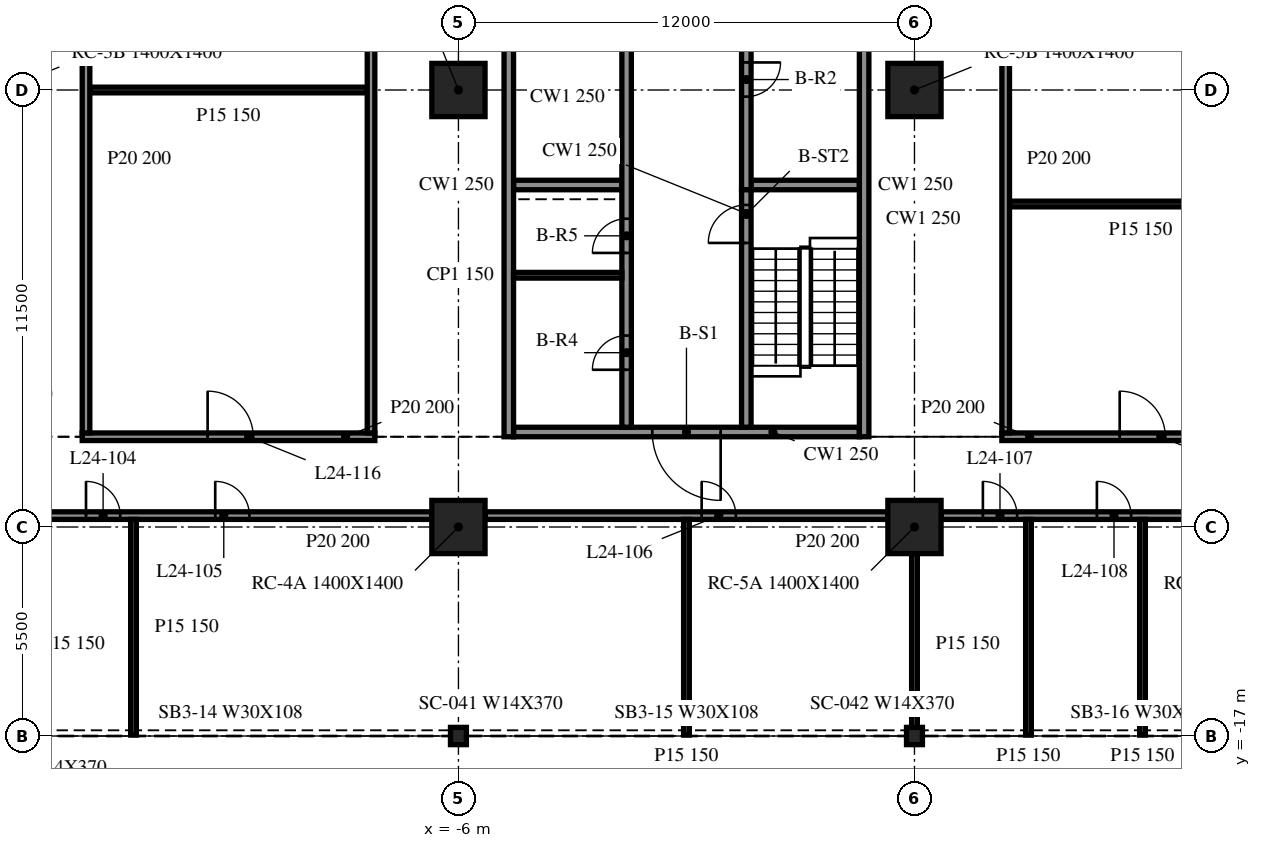
"""IFC4 building model, lengths in metres.
Left out: names, types, materials, properties, quantities, classifications, styles, units other than length and angle.
Written with IfcOpenShell. Run it as: python <this file> out.ifc"""

import sys

from ifc_helpers import new_model, si_unit, direction, frame, frame_2d, origin, origin_2d, place, context, subcontext, project, spatial, rectangle, i_section, extrude, element, fill, save


model = new_model("IFC4")
c1 = context("Model", 3, precision=1e-05, world=origin(), true_north=direction((0.0, 1.0)))
c2 = subcontext(c1, "Body", "Model", "MODEL_VIEW")
j1 = project(units=[si_unit("LENGTHUNIT", "METRE"), si_unit("PLANEANGLEUNIT", "RADIAN")], contexts=[c1])
p1 = place(None, origin())
s1 = spatial("IfcSite", under=j1, at=p1, CompositionType="ELEMENT")
p2 = place(p1, origin())
s2 = spatial("IfcBuilding", under=s1, at=p2, CompositionType="ELEMENT")
p3 = place(p2, frame((0.0, 0.0, 105.3)))
s3 = spatial("IfcBuildingStorey", under=s2, at=p3, CompositionType="ELEMENT", Elevation=105.3)
for number, where, z_axis, x_axis in (
    (1, (-6.0, -11.5, -0.34), (0.0, 0.0, 1.0), (1.0, 0.0, 0.0)),
    (2, (-6.0, 0.0, -0.34), (0.0, 0.0, 1.0), (1.0, 0.0, 0.0)),
    (3, (6.0, -11.5, -0.34), (0.0, 0.0, 1.0), (1.0, 0.0, 0.0)),
    (4, (6.0, 0.0, -0.34), (0.0, 0.0, 1.0), (1.0, 0.0, 0.0)),
):
    element("IfcColumn", number, at=place(p3, frame(where, z_axis=z_axis, x_axis=x_axis)), inside=s3, PredefinedType="COLUMN", context=c2, shape_type="SweptSolid", body=[
        extrude(rectangle(XDim=1.4, YDim=1.4, at=origin_2d()), origin(), (0.0, 0.0, 1.0), 4.1),
    ])
for number, where, z_axis, x_axis in (
    (5, (-6.0, -17.0, -0.34), (0.0, 0.0, 1.0), (1.0, 0.0, 0.0)),
    (6, (6.0, -17.0, -0.34), (0.0, 0.0, 1.0), (1.0, 0.0, 0.0)),
):
    element("IfcColumn", number, at=place(p3, frame(where, z_axis=z_axis, x_axis=x_axis)), inside=s3, PredefinedType="COLUMN", context=c2, shape_type="SweptSolid", body=[
        extrude(i_section(OverallWidth=0.419, OverallDepth=0.455, WebThickness=0.042, FlangeThickness=0.068, at=origin_2d()), origin(), (0.0, 0.0, 1.0), 4.1),
    ])
for number, where, z_axis, x_axis in (
    (7, (-4.675, 15.125, 0.0), (0.0, 0.0, 1.0), (0.0, -1.0, 0.0)),
    (8, (4.675, -9.125, 0.0), (0.0, 0.0, 1.0), (0.0, 1.0, 0.0)),
):
    element("IfcWall", number, at=place(p3, frame(where, z_axis=z_axis, x_axis=x_axis)), inside=s3, PredefinedType="SOLIDWALL", context=c2, shape_type="SweptSolid", body=[
        extrude(rectangle(XDim=24.25, YDim=0.25, at=frame_2d((12.125, 0.0))), origin(), (0.0, 0.0, 1.0), 3.76),
    ])
p4 = place(p3, frame((4.55, -9.0, 0.0), z_axis=(0.0, 0.0, 1.0), x_axis=(-1.0, 0.0, 0.0)))
e9 = element("IfcWall", 9, at=p4, inside=s3, PredefinedType="SOLIDWALL", context=c2, shape_type="SweptSolid", body=[
    extrude(rectangle(XDim=9.1, YDim=0.25, at=frame_2d((4.55, 0.0))), origin(), (0.0, 0.0, 1.0), 3.76),
])
p5 = place(p4, frame((3.65, 0.0, 0.0)))
e10 = element("IfcOpeningElement", 10, at=p5, cuts=e9, PredefinedType="OPENING", context=c2, shape_type="SweptSolid", body=[
    extrude(rectangle(XDim=1.8, YDim=2.1, at=frame_2d((0.9, 1.05))), frame((0.0, 0.135, 0.0), z_axis=(0.0, -1.0, 0.0), x_axis=(1.0, 0.0, 0.0)), (0.0, 0.0, 1.0), 0.27),
])
p6 = place(p3, frame((-1.575, -8.875, 0.0), z_axis=(0.0, 0.0, 1.0), x_axis=(0.0, 1.0, 0.0)))
e11 = element("IfcWall", 11, at=p6, inside=s3, PredefinedType="SOLIDWALL", context=c2, shape_type="SweptSolid", body=[
    extrude(rectangle(XDim=23.75, YDim=0.25, at=frame_2d((11.875, 0.0))), origin(), (0.0, 0.0, 1.0), 3.76),
])
p7 = place(p6, frame((11.425, 0.0, 0.0)))
e12 = element("IfcOpeningElement", 12, at=p7, cuts=e11, PredefinedType="OPENING", context=c2, shape_type="SweptSolid", body=[
    extrude(rectangle(XDim=0.9, YDim=2.1, at=frame_2d((0.45, 1.05))), frame((0.0, 0.135, 0.0), z_axis=(0.0, -1.0, 0.0), x_axis=(1.0, 0.0, 0.0)), (0.0, 0.0, 1.0), 0.27),
])
p8 = place(p6, frame((1.512, 0.0, 0.0)))
e13 = element("IfcOpeningElement", 13, at=p8, cuts=e11, PredefinedType="OPENING", context=c2, shape_type="SweptSolid", body=[
    extrude(rectangle(XDim=0.9, YDim=2.1, at=frame_2d((0.45, 1.05))), frame((0.0, 0.135, 0.0), z_axis=(0.0, -1.0, 0.0), x_axis=(1.0, 0.0, 0.0)), (0.0, 0.0, 1.0), 0.27),
])
p9 = place(p6, frame((4.587, 0.0, 0.0)))
e14 = element("IfcOpeningElement", 14, at=p9, cuts=e11, PredefinedType="OPENING", context=c2, shape_type="SweptSolid", body=[
    extrude(rectangle(XDim=0.9, YDim=2.1, at=frame_2d((0.45, 1.05))), frame((0.0, 0.135, 0.0), z_axis=(0.0, -1.0, 0.0), x_axis=(1.0, 0.0, 0.0)), (0.0, 0.0, 1.0), 0.27),
])
p10 = place(p6, frame((18.462, 0.0, 0.0)))
e15 = element("IfcOpeningElement", 15, at=p10, cuts=e11, PredefinedType="OPENING", context=c2, shape_type="SweptSolid", body=[
    extrude(rectangle(XDim=0.9, YDim=2.1, at=frame_2d((0.45, 1.05))), frame((0.0, 0.135, 0.0), z_axis=(0.0, -1.0, 0.0), x_axis=(1.0, 0.0, 0.0)), (0.0, 0.0, 1.0), 0.27),
])
p11 = place(p6, frame((21.538, 0.0, 0.0)))
e16 = element("IfcOpeningElement", 16, at=p11, cuts=e11, PredefinedType="OPENING", context=c2, shape_type="SweptSolid", body=[
    extrude(rectangle(XDim=0.9, YDim=2.1, at=frame_2d((0.45, 1.05))), frame((0.0, 0.135, 0.0), z_axis=(0.0, -1.0, 0.0), x_axis=(1.0, 0.0, 0.0)), (0.0, 0.0, 1.0), 0.27),
])
p12 = place(p3, frame((1.575, -8.875, 0.0), z_axis=(0.0, 0.0, 1.0), x_axis=(0.0, 1.0, 0.0)))
e17 = element("IfcWall", 17, at=p12, inside=s3, PredefinedType="SOLIDWALL", context=c2, shape_type="SweptSolid", body=[
    extrude(rectangle(XDim=6.25, YDim=0.25, at=frame_2d((3.125, 0.0))), origin(), (0.0, 0.0, 1.0), 3.76),
])
p13 = place(p12, frame((4.85, 0.0, 0.0)))
e18 = element("IfcOpeningElement", 18, at=p13, cuts=e17, PredefinedType="OPENING", context=c2, shape_type="SweptSolid", body=[
    extrude(rectangle(XDim=1.0, YDim=2.1, at=frame_2d((0.5, 1.05))), frame((0.0, 0.135, 0.0), z_axis=(0.0, -1.0, 0.0), x_axis=(1.0, 0.0, 0.0)), (0.0, 0.0, 1.0), 0.27),
])
p14 = place(p3, frame((1.575, 14.875, 0.0), z_axis=(0.0, 0.0, 1.0), x_axis=(0.0, -1.0, 0.0)))
e19 = element("IfcWall", 19, at=p14, inside=s3, PredefinedType="SOLIDWALL", context=c2, shape_type="SweptSolid", body=[
    extrude(rectangle(XDim=17.5, YDim=0.25, at=frame_2d((8.75, 0.0))), origin(), (0.0, 0.0, 1.0), 3.76),
])
p15 = place(p14, frame((14.15, 0.0, 0.0)))
e20 = element("IfcOpeningElement", 20, at=p15, cuts=e19, PredefinedType="OPENING", context=c2, shape_type="SweptSolid", body=[
    extrude(rectangle(XDim=0.9, YDim=2.1, at=frame_2d((0.45, 1.05))), frame((0.0, 0.135, 0.0), z_axis=(0.0, -1.0, 0.0), x_axis=(1.0, 0.0, 0.0)), (0.0, 0.0, 1.0), 0.27),
])
p16 = place(p14, frame((8.7, 0.0, 0.0)))
e21 = element("IfcOpeningElement", 21, at=p16, cuts=e19, PredefinedType="OPENING", context=c2, shape_type="SweptSolid", body=[
    extrude(rectangle(XDim=0.9, YDim=2.1, at=frame_2d((0.45, 1.05))), frame((0.0, 0.135, 0.0), z_axis=(0.0, -1.0, 0.0), x_axis=(1.0, 0.0, 0.0)), (0.0, 0.0, 1.0), 0.27),
])
p17 = place(p14, frame((4.587, 0.0, 0.0)))
e22 = element("IfcOpeningElement", 22, at=p17, cuts=e19, PredefinedType="OPENING", context=c2, shape_type="SweptSolid", body=[
    extrude(rectangle(XDim=0.9, YDim=2.1, at=frame_2d((0.45, 1.05))), frame((0.0, 0.135, 0.0), z_axis=(0.0, -1.0, 0.0), x_axis=(1.0, 0.0, 0.0)), (0.0, 0.0, 1.0), 0.27),
])
p18 = place(p14, frame((2.55, 0.0, 0.0)))
e23 = element("IfcOpeningElement", 23, at=p18, cuts=e19, PredefinedType="OPENING", context=c2, shape_type="SweptSolid", body=[
    extrude(rectangle(XDim=0.9, YDim=2.1, at=frame_2d((0.45, 1.05))), frame((0.0, 0.135, 0.0), z_axis=(0.0, -1.0, 0.0), x_axis=(1.0, 0.0, 0.0)), (0.0, 0.0, 1.0), 0.27),
])
p19 = place(p14, frame((0.512, 0.0, 0.0)))
e24 = element("IfcOpeningElement", 24, at=p19, cuts=e19, PredefinedType="OPENING", context=c2, shape_type="SweptSolid", body=[
    extrude(rectangle(XDim=0.9, YDim=2.1, at=frame_2d((0.45, 1.05))), frame((0.0, 0.135, 0.0), z_axis=(0.0, -1.0, 0.0), x_axis=(1.0, 0.0, 0.0)), (0.0, 0.0, 1.0), 0.27),
])
for number, where, z_axis, x_axis in (
    (25, (-4.55, -2.5, 0.0), (0.0, 0.0, 1.0), (1.0, 0.0, 0.0)),
    (26, (1.7, -2.5, 0.0), (0.0, 0.0, 1.0), (1.0, 0.0, 0.0)),
):
    element("IfcWall", number, at=place(p3, frame(where, z_axis=z_axis, x_axis=x_axis)), inside=s3, PredefinedType="SOLIDWALL", context=c2, shape_type="SweptSolid", body=[
        extrude(rectangle(XDim=2.85, YDim=0.25, at=frame_2d((1.425, 0.0))), origin(), (0.0, 0.0, 1.0), 3.76),
    ])
p20 = place(p3, frame((-4.55, -4.875, 0.0), z_axis=(0.0, 0.0, 1.0), x_axis=(1.0, 0.0, 0.0)))
e27 = element("IfcWall", 27, at=p20, inside=s3, PredefinedType="PARTITIONING", context=c2, shape_type="SweptSolid", body=[
    extrude(rectangle(XDim=2.85, YDim=0.15, at=frame_2d((1.425, 0.0))), origin(), (0.0, 0.0, 1.0), 3.76),
])
p21 = place(p3, frame((-17.3, -11.2, 0.0), z_axis=(0.0, 0.0, 1.0), x_axis=(1.0, 0.0, 0.0)))
e28 = element("IfcWall", 28, at=p21, inside=s3, PredefinedType="PARTITIONING", context=c2, shape_type="SweptSolid", body=[
    extrude(rectangle(XDim=10.6, YDim=0.2, at=frame_2d((5.3, 0.0))), origin(), (0.0, 0.0, 1.0), 3.76),
])
p22 = place(p21, frame((1.5, 0.0, 0.0)))
e29 = element("IfcOpeningElement", 29, at=p22, cuts=e28, PredefinedType="OPENING", context=c2, shape_type="SweptSolid", body=[
    extrude(rectangle(XDim=0.9, YDim=2.1, at=frame_2d((0.45, 1.05))), frame((0.0, 0.11, 0.0), z_axis=(0.0, -1.0, 0.0), x_axis=(1.0, 0.0, 0.0)), (0.0, 0.0, 1.0), 0.22),
])
p23 = place(p21, frame((4.9, 0.0, 0.0)))
e30 = element("IfcOpeningElement", 30, at=p23, cuts=e28, PredefinedType="OPENING", context=c2, shape_type="SweptSolid", body=[
    extrude(rectangle(XDim=0.9, YDim=2.1, at=frame_2d((0.45, 1.05))), frame((0.0, 0.11, 0.0), z_axis=(0.0, -1.0, 0.0), x_axis=(1.0, 0.0, 0.0)), (0.0, 0.0, 1.0), 0.22),
])
p24 = place(p3, frame((-5.3, -11.2, 0.0), z_axis=(0.0, 0.0, 1.0), x_axis=(1.0, 0.0, 0.0)))
e31 = element("IfcWall", 31, at=p24, inside=s3, PredefinedType="PARTITIONING", context=c2, shape_type="SweptSolid", body=[
    extrude(rectangle(XDim=10.6, YDim=0.2, at=frame_2d((5.3, 0.0))), origin(), (0.0, 0.0, 1.0), 3.76),
])
p25 = place(p24, frame((5.7, 0.0, 0.0)))
e32 = element("IfcOpeningElement", 32, at=p25, cuts=e31, PredefinedType="OPENING", context=c2, shape_type="SweptSolid", body=[
    extrude(rectangle(XDim=0.9, YDim=2.1, at=frame_2d((0.45, 1.05))), frame((0.0, 0.11, 0.0), z_axis=(0.0, -1.0, 0.0), x_axis=(1.0, 0.0, 0.0)), (0.0, 0.0, 1.0), 0.22),
])
p26 = place(p3, frame((6.7, -11.2, 0.0), z_axis=(0.0, 0.0, 1.0), x_axis=(1.0, 0.0, 0.0)))
e33 = element("IfcWall", 33, at=p26, inside=s3, PredefinedType="PARTITIONING", context=c2, shape_type="SweptSolid", body=[
    extrude(rectangle(XDim=10.6, YDim=0.2, at=frame_2d((5.3, 0.0))), origin(), (0.0, 0.0, 1.0), 3.76),
])
p27 = place(p26, frame((1.1, 0.0, 0.0)))
e34 = element("IfcOpeningElement", 34, at=p27, cuts=e33, PredefinedType="OPENING", context=c2, shape_type="SweptSolid", body=[
    extrude(rectangle(XDim=0.9, YDim=2.1, at=frame_2d((0.45, 1.05))), frame((0.0, 0.11, 0.0), z_axis=(0.0, -1.0, 0.0), x_axis=(1.0, 0.0, 0.0)), (0.0, 0.0, 1.0), 0.22),
])
p28 = place(p26, frame((4.1, 0.0, 0.0)))
e35 = element("IfcOpeningElement", 35, at=p28, cuts=e33, PredefinedType="OPENING", context=c2, shape_type="SweptSolid", body=[
    extrude(rectangle(XDim=0.9, YDim=2.1, at=frame_2d((0.45, 1.05))), frame((0.0, 0.11, 0.0), z_axis=(0.0, -1.0, 0.0), x_axis=(1.0, 0.0, 0.0)), (0.0, 0.0, 1.0), 0.22),
])
p29 = place(p3, frame((-15.9, -9.125, 0.0), z_axis=(0.0, 0.0, 1.0), x_axis=(1.0, 0.0, 0.0)))
e36 = element("IfcWall", 36, at=p29, inside=s3, PredefinedType="PARTITIONING", context=c2, shape_type="SweptSolid", body=[
    extrude(rectangle(XDim=7.7, YDim=0.2, at=frame_2d((3.85, 0.0))), origin(), (0.0, 0.0, 1.0), 3.76),
])
p30 = place(p29, frame((3.3, 0.0, 0.0)))
e37 = element("IfcOpeningElement", 37, at=p30, cuts=e36, PredefinedType="OPENING", context=c2, shape_type="SweptSolid", body=[
    extrude(rectangle(XDim=1.2, YDim=2.1, at=frame_2d((0.6, 1.05))), frame((0.0, 0.11, 0.0), z_axis=(0.0, -1.0, 0.0), x_axis=(1.0, 0.0, 0.0)), (0.0, 0.0, 1.0), 0.22),
])
p31 = place(p3, frame((8.3, -9.125, 0.0), z_axis=(0.0, 0.0, 1.0), x_axis=(1.0, 0.0, 0.0)))
e38 = element("IfcWall", 38, at=p31, inside=s3, PredefinedType="PARTITIONING", context=c2, shape_type="SweptSolid", body=[
    extrude(rectangle(XDim=7.3, YDim=0.2, at=frame_2d((3.65, 0.0))), origin(), (0.0, 0.0, 1.0), 3.76),
])
p32 = place(p31, frame((3.1, 0.0, 0.0)))
e39 = element("IfcOpeningElement", 39, at=p32, cuts=e38, PredefinedType="OPENING", context=c2, shape_type="SweptSolid", body=[
    extrude(rectangle(XDim=1.2, YDim=2.1, at=frame_2d((0.6, 1.05))), frame((0.0, 0.11, 0.0), z_axis=(0.0, -1.0, 0.0), x_axis=(1.0, 0.0, 0.0)), (0.0, 0.0, 1.0), 0.22),
])
p33 = place(p3, frame((8.5, -3.0, 0.0), z_axis=(0.0, 0.0, 1.0), x_axis=(1.0, 0.0, 0.0)))
e40 = element("IfcWall", 40, at=p33, inside=s3, PredefinedType="PARTITIONING", context=c2, shape_type="SweptSolid", body=[
    extrude(rectangle(XDim=6.9, YDim=0.15, at=frame_2d((3.45, 0.0))), origin(), (0.0, 0.0, 1.0), 3.76),
])
p34 = place(p3, frame((-15.7, 0.0, 0.0), z_axis=(0.0, 0.0, 1.0), x_axis=(1.0, 0.0, 0.0)))
e41 = element("IfcWall", 41, at=p34, inside=s3, PredefinedType="PARTITIONING", context=c2, shape_type="SweptSolid", body=[
    extrude(rectangle(XDim=7.3, YDim=0.15, at=frame_2d((3.65, 0.0))), origin(), (0.0, 0.0, 1.0), 3.76),
])
p35 = place(p3, frame((-15.8, -9.025, 0.0), z_axis=(0.0, 0.0, 1.0), x_axis=(0.0, 1.0, 0.0)))
e42 = element("IfcWall", 42, at=p35, inside=s3, PredefinedType="PARTITIONING", context=c2, shape_type="SweptSolid", body=[
    extrude(rectangle(XDim=24.05, YDim=0.2, at=frame_2d((12.025, 0.0))), origin(), (0.0, 0.0, 1.0), 3.76),
])
p36 = place(p35, frame((11.5, 0.0, 0.0)))
e43 = element("IfcOpeningElement", 43, at=p36, cuts=e42, PredefinedType="OPENING", context=c2, shape_type="SweptSolid", body=[
    extrude(rectangle(XDim=1.0, YDim=2.1, at=frame_2d((0.5, 1.05))), frame((0.0, 0.11, 0.0), z_axis=(0.0, -1.0, 0.0), x_axis=(1.0, 0.0, 0.0)), (0.0, 0.0, 1.0), 0.22),
])
p37 = place(p3, frame((-14.55, -16.975, 0.0), z_axis=(0.0, 0.0, 1.0), x_axis=(0.0, 1.0, 0.0)))
e44 = element("IfcWall", 44, at=p37, inside=s3, PredefinedType="PARTITIONING", context=c2, shape_type="SweptSolid", body=[
    extrude(rectangle(XDim=5.675, YDim=0.15, at=frame_2d((2.837, 0.0))), origin(), (0.0, 0.0, 1.0), 3.76),
])
p38 = place(p3, frame((-8.3, -9.025, 0.0), z_axis=(0.0, 0.0, 1.0), x_axis=(0.0, 1.0, 0.0)))
e45 = element("IfcWall", 45, at=p38, inside=s3, PredefinedType="PARTITIONING", context=c2, shape_type="SweptSolid", body=[
    extrude(rectangle(XDim=24.05, YDim=0.2, at=frame_2d((12.025, 0.0))), origin(), (0.0, 0.0, 1.0), 3.76),
])
p39 = place(p3, frame((0.0, -16.975, 0.0), z_axis=(0.0, 0.0, 1.0), x_axis=(0.0, 1.0, 0.0)))
e46 = element("IfcWall", 46, at=p39, inside=s3, PredefinedType="PARTITIONING", context=c2, shape_type="SweptSolid", body=[
    extrude(rectangle(XDim=5.675, YDim=0.15, at=frame_2d((2.837, 0.0))), origin(), (0.0, 0.0, 1.0), 3.76),
])
p40 = place(p3, frame((6.0, -16.975, 0.0), z_axis=(0.0, 0.0, 1.0), x_axis=(0.0, 1.0, 0.0)))
e47 = element("IfcWall", 47, at=p40, inside=s3, PredefinedType="PARTITIONING", context=c2, shape_type="SweptSolid", body=[
    extrude(rectangle(XDim=4.775, YDim=0.15, at=frame_2d((2.388, 0.0))), origin(), (0.0, 0.0, 1.0), 3.76),
])
p41 = place(p3, frame((8.4, -9.025, 0.0), z_axis=(0.0, 0.0, 1.0), x_axis=(0.0, 1.0, 0.0)))
e48 = element("IfcWall", 48, at=p41, inside=s3, PredefinedType="PARTITIONING", context=c2, shape_type="SweptSolid", body=[
    extrude(rectangle(XDim=24.05, YDim=0.2, at=frame_2d((12.025, 0.0))), origin(), (0.0, 0.0, 1.0), 3.76),
])
p42 = place(p41, frame((11.5, 0.0, 0.0)))
e49 = element("IfcOpeningElement", 49, at=p42, cuts=e48, PredefinedType="OPENING", context=c2, shape_type="SweptSolid", body=[
    extrude(rectangle(XDim=1.0, YDim=2.1, at=frame_2d((0.5, 1.05))), frame((0.0, 0.11, 0.0), z_axis=(0.0, -1.0, 0.0), x_axis=(1.0, 0.0, 0.0)), (0.0, 0.0, 1.0), 0.22),
])
for number, where, z_axis, x_axis in (
    (50, (9.0, -16.975, 0.0), (0.0, 0.0, 1.0), (0.0, 1.0, 0.0)),
    (51, (12.0, -16.975, 0.0), (0.0, 0.0, 1.0), (0.0, 1.0, 0.0)),
):
    element("IfcWall", number, at=place(p3, frame(where, z_axis=z_axis, x_axis=x_axis)), inside=s3, PredefinedType="PARTITIONING", context=c2, shape_type="SweptSolid", body=[
        extrude(rectangle(XDim=5.675, YDim=0.15, at=frame_2d((2.837, 0.0))), origin(), (0.0, 0.0, 1.0), 3.76),
    ])
p43 = place(p5, origin())
e52 = element("IfcDoor", 52, at=p43, inside=s3, OperationType="DOUBLE_DOOR_SINGLE_SWING", PredefinedType="DOOR", context=c2, shape_type="SweptSolid", body=[
    extrude(rectangle(XDim=1.8, YDim=2.1, at=frame_2d((0.9, 1.05))), frame((0.0, 0.025, 0.0), z_axis=(0.0, -1.0, 0.0), x_axis=(1.0, 0.0, 0.0)), (0.0, 0.0, 1.0), 0.05),
])
fill(e10, e52)
p44 = place(p15, origin())
e53 = element("IfcDoor", 53, at=p44, inside=s3, OperationType="SINGLE_SWING_RIGHT", PredefinedType="DOOR", context=c2, shape_type="SweptSolid", body=[
    extrude(rectangle(XDim=0.9, YDim=2.1, at=frame_2d((0.45, 1.05))), frame((0.0, 0.025, 0.0), z_axis=(0.0, -1.0, 0.0), x_axis=(1.0, 0.0, 0.0)), (0.0, 0.0, 1.0), 0.05),
])
fill(e20, e53)
p45 = place(p8, origin())
e54 = element("IfcDoor", 54, at=p45, inside=s3, OperationType="SINGLE_SWING_RIGHT", PredefinedType="DOOR", context=c2, shape_type="SweptSolid", body=[
    extrude(rectangle(XDim=0.9, YDim=2.1, at=frame_2d((0.45, 1.05))), frame((0.0, 0.025, 0.0), z_axis=(0.0, -1.0, 0.0), x_axis=(1.0, 0.0, 0.0)), (0.0, 0.0, 1.0), 0.05),
])
fill(e13, e54)
p46 = place(p9, origin())
e55 = element("IfcDoor", 55, at=p46, inside=s3, OperationType="SINGLE_SWING_LEFT", PredefinedType="DOOR", context=c2, shape_type="SweptSolid", body=[
    extrude(rectangle(XDim=0.9, YDim=2.1, at=frame_2d((0.45, 1.05))), frame((0.0, 0.025, 0.0), z_axis=(0.0, -1.0, 0.0), x_axis=(1.0, 0.0, 0.0)), (0.0, 0.0, 1.0), 0.05),
])
fill(e14, e55)
p47 = place(p13, origin())
e56 = element("IfcDoor", 56, at=p47, inside=s3, OperationType="SINGLE_SWING_LEFT", PredefinedType="DOOR", context=c2, shape_type="SweptSolid", body=[
    extrude(rectangle(XDim=1.0, YDim=2.1, at=frame_2d((0.5, 1.05))), frame((0.0, 0.025, 0.0), z_axis=(0.0, -1.0, 0.0), x_axis=(1.0, 0.0, 0.0)), (0.0, 0.0, 1.0), 0.05),
])
fill(e18, e56)
p48 = place(p22, origin())
e57 = element("IfcDoor", 57, at=p48, inside=s3, OperationType="SINGLE_SWING_RIGHT", PredefinedType="DOOR", context=c2, shape_type="SweptSolid", body=[
    extrude(rectangle(XDim=0.9, YDim=2.1, at=frame_2d((0.45, 1.05))), frame((0.0, 0.025, 0.0), z_axis=(0.0, -1.0, 0.0), x_axis=(1.0, 0.0, 0.0)), (0.0, 0.0, 1.0), 0.05),
])
fill(e29, e57)
p49 = place(p23, origin())
e58 = element("IfcDoor", 58, at=p49, inside=s3, OperationType="SINGLE_SWING_LEFT", PredefinedType="DOOR", context=c2, shape_type="SweptSolid", body=[
    extrude(rectangle(XDim=0.9, YDim=2.1, at=frame_2d((0.45, 1.05))), frame((0.0, 0.025, 0.0), z_axis=(0.0, -1.0, 0.0), x_axis=(1.0, 0.0, 0.0)), (0.0, 0.0, 1.0), 0.05),
])
fill(e30, e58)
p50 = place(p25, origin())
e59 = element("IfcDoor", 59, at=p50, inside=s3, OperationType="SINGLE_SWING_LEFT", PredefinedType="DOOR", context=c2, shape_type="SweptSolid", body=[
    extrude(rectangle(XDim=0.9, YDim=2.1, at=frame_2d((0.45, 1.05))), frame((0.0, 0.025, 0.0), z_axis=(0.0, -1.0, 0.0), x_axis=(1.0, 0.0, 0.0)), (0.0, 0.0, 1.0), 0.05),
])
fill(e32, e59)
p51 = place(p27, origin())
e60 = element("IfcDoor", 60, at=p51, inside=s3, OperationType="SINGLE_SWING_RIGHT", PredefinedType="DOOR", context=c2, shape_type="SweptSolid", body=[
    extrude(rectangle(XDim=0.9, YDim=2.1, at=frame_2d((0.45, 1.05))), frame((0.0, 0.025, 0.0), z_axis=(0.0, -1.0, 0.0), x_axis=(1.0, 0.0, 0.0)), (0.0, 0.0, 1.0), 0.05),
])
fill(e34, e60)
p52 = place(p28, origin())
e61 = element("IfcDoor", 61, at=p52, inside=s3, OperationType="SINGLE_SWING_RIGHT", PredefinedType="DOOR", context=c2, shape_type="SweptSolid", body=[
    extrude(rectangle(XDim=0.9, YDim=2.1, at=frame_2d((0.45, 1.05))), frame((0.0, 0.025, 0.0), z_axis=(0.0, -1.0, 0.0), x_axis=(1.0, 0.0, 0.0)), (0.0, 0.0, 1.0), 0.05),
])
fill(e35, e61)
p53 = place(p32, origin())
e62 = element("IfcDoor", 62, at=p53, inside=s3, OperationType="SINGLE_SWING_RIGHT", PredefinedType="DOOR", context=c2, shape_type="SweptSolid", body=[
    extrude(rectangle(XDim=1.2, YDim=2.1, at=frame_2d((0.6, 1.05))), frame((0.0, 0.025, 0.0), z_axis=(0.0, -1.0, 0.0), x_axis=(1.0, 0.0, 0.0)), (0.0, 0.0, 1.0), 0.05),
])
fill(e39, e62)
p54 = place(p30, origin())
e63 = element("IfcDoor", 63, at=p54, inside=s3, OperationType="SINGLE_SWING_RIGHT", PredefinedType="DOOR", context=c2, shape_type="SweptSolid", body=[
    extrude(rectangle(XDim=1.2, YDim=2.1, at=frame_2d((0.6, 1.05))), frame((0.0, 0.025, 0.0), z_axis=(0.0, -1.0, 0.0), x_axis=(1.0, 0.0, 0.0)), (0.0, 0.0, 1.0), 0.05),
])
fill(e37, e63)
save(model, sys.argv[1])
